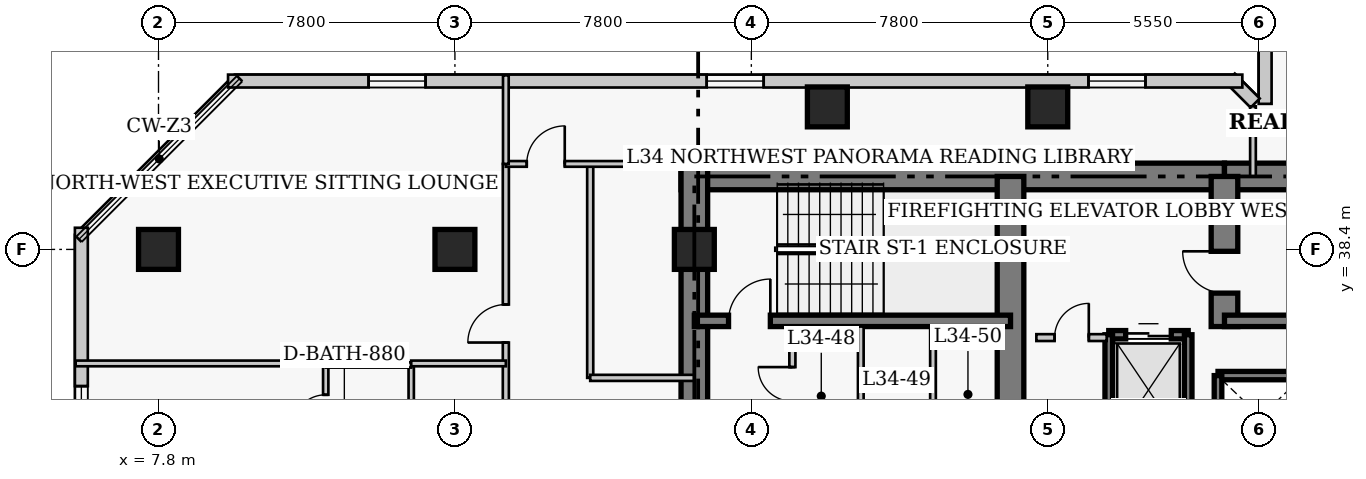
"""IFC4 building model, lengths in metres.
Left out: names, types, materials, properties, quantities, classifications, styles, units other than length and angle.
Written with IfcOpenShell. Run it as: python <this file> out.ifc"""

import sys

from ifc_helpers import new_model, si_unit, direction, frame, frame_2d, origin, origin_2d, place, context, subcontext, project, spatial, rectangle, extrude, element, fill, save


model = new_model("IFC4")
c1 = context("Model", 3, precision=1e-05, world=origin(), true_north=direction((0.0, 1.0)))
c2 = subcontext(c1, "Body", "Model", "MODEL_VIEW")
j1 = project(units=[si_unit("LENGTHUNIT", "METRE"), si_unit("PLANEANGLEUNIT", "RADIAN")], contexts=[c1])
p1 = place(None, origin())
s1 = spatial("IfcSite", under=j1, at=p1, CompositionType="ELEMENT")
p2 = place(p1, origin())
s2 = spatial("IfcBuilding", under=s1, at=p2, CompositionType="ELEMENT")
p3 = place(p2, frame((0.0, 0.0, 138.4)))
s3 = spatial("IfcBuildingStorey", under=s2, at=p3, CompositionType="ELEMENT", Elevation=138.4)
p4 = place(p3, frame((21.55, 40.32, 0.0), z_axis=(0.0, 0.0, 1.0), x_axis=(1.0, 0.0, 0.0)))
e1 = element("IfcWall", 1, at=p4, inside=s3, PredefinedType="SHEAR", context=c2, shape_type="SweptSolid", body=[
    extrude(rectangle(XDim=14.3, YDim=0.7, at=frame_2d((7.15, 0.0))), origin(), (0.0, 0.0, 1.0), 3.8),
])
p5 = place(p3, frame((35.85, 40.32, 0.0), z_axis=(0.0, 0.0, 1.0), x_axis=(1.0, 0.0, 0.0)))
e2 = element("IfcWall", 2, at=p5, inside=s3, PredefinedType="SHEAR", context=c2, shape_type="SweptSolid", body=[
    extrude(rectangle(XDim=12.6, YDim=0.7, at=frame_2d((6.3, 0.0))), origin(), (0.0, 0.0, 1.0), 3.8),
])
p6 = place(p3, frame((21.9, 27.05, 0.0), z_axis=(0.0, 0.0, 1.0), x_axis=(0.0, 1.0, 0.0)))
e3 = element("IfcWall", 3, at=p6, inside=s3, PredefinedType="SHEAR", context=c2, shape_type="SweptSolid", body=[
    extrude(rectangle(XDim=13.62, YDim=0.7, at=frame_2d((6.81, 0.0))), origin(), (0.0, 0.0, 1.0), 3.8),
])
p7 = place(p3, frame((30.22, 33.1, 0.0), z_axis=(0.0, 0.0, 1.0), x_axis=(0.0, 1.0, 0.0)))
e4 = element("IfcWall", 4, at=p7, inside=s3, PredefinedType="SHEAR", context=c2, shape_type="SweptSolid", body=[
    extrude(rectangle(XDim=7.22, YDim=0.7, at=frame_2d((3.61, 0.0))), origin(), (0.0, 0.0, 1.0), 3.8),
])
p8 = place(p3, frame((35.85, 36.37, 0.0), z_axis=(0.0, 0.0, 1.0), x_axis=(0.0, 1.0, 0.0)))
e5 = element("IfcWall", 5, at=p8, inside=s3, PredefinedType="SHEAR", context=c2, shape_type="SweptSolid", body=[
    extrude(rectangle(XDim=3.95, YDim=0.7, at=frame_2d((1.975, 0.0))), origin(), (0.0, 0.0, 1.0), 3.8),
])
p9 = place(p8, frame((0.88, 0.0, 0.0)))
e6 = element("IfcOpeningElement", 6, at=p9, cuts=e5, PredefinedType="OPENING", context=c2, shape_type="SweptSolid", body=[
    extrude(rectangle(XDim=1.1, YDim=2.15, at=frame_2d((0.55, 1.075))), frame((0.0, 0.36, 0.0), z_axis=(0.0, -1.0, 0.0), x_axis=(1.0, 0.0, 0.0)), (0.0, 0.0, 1.0), 0.72),
])
p10 = place(p3, frame((21.9, 36.52, 0.0), z_axis=(0.0, 0.0, 1.0), x_axis=(1.0, 0.0, 0.0)))
e7 = element("IfcWall", 7, at=p10, inside=s3, PredefinedType="SHEAR", context=c2, shape_type="SweptSolid", body=[
    extrude(rectangle(XDim=8.32, YDim=0.3, at=frame_2d((4.16, 0.0))), origin(), (0.0, 0.0, 1.0), 3.8),
])
p11 = place(p10, frame((0.9, 0.0, 0.0)))
e8 = element("IfcOpeningElement", 8, at=p11, cuts=e7, PredefinedType="OPENING", context=c2, shape_type="SweptSolid", body=[
    extrude(rectangle(XDim=1.1, YDim=2.15, at=frame_2d((0.55, 1.075))), frame((0.0, 0.16, 0.0), z_axis=(0.0, -1.0, 0.0), x_axis=(1.0, 0.0, 0.0)), (0.0, 0.0, 1.0), 0.32),
])
p12 = place(p3, frame((35.85, 36.52, 0.0), z_axis=(0.0, 0.0, 1.0), x_axis=(1.0, 0.0, 0.0)))
e9 = element("IfcWall", 9, at=p12, inside=s3, PredefinedType="SHEAR", context=c2, shape_type="SweptSolid", body=[
    extrude(rectangle(XDim=8.33, YDim=0.3, at=frame_2d((4.165, 0.0))), origin(), (0.0, 0.0, 1.0), 3.8),
])
for number, where, z_axis, x_axis in (
    (10, (7.8, 38.4, 0.0), (0.0, 0.0, 1.0), (1.0, 0.0, 0.0)),
    (11, (15.6, 38.4, 0.0), (0.0, 0.0, 1.0), (1.0, 0.0, 0.0)),
    (12, (21.9, 38.4, 0.0), (0.0, 0.0, 1.0), (1.0, 0.0, 0.0)),
    (13, (25.4, 42.15, 0.0), (0.0, 0.0, 1.0), (1.0, 0.0, 0.0)),
    (14, (31.2, 42.15, 0.0), (0.0, 0.0, 1.0), (1.0, 0.0, 0.0)),
):
    element("IfcColumn", number, at=place(p3, frame(where, z_axis=z_axis, x_axis=x_axis)), inside=s3, PredefinedType="COLUMN", context=c2, shape_type="SweptSolid", body=[
        extrude(rectangle(XDim=1.05, YDim=1.05, at=origin_2d()), origin(), (0.0, 0.0, 1.0), 3.8),
    ])
p13 = place(p3, frame((36.92, 44.37, 0.0), z_axis=(0.0, 0.0, 1.0), x_axis=(0.0, -1.0, 0.0)))
e15 = element("IfcWall", 15, at=p13, inside=s3, PredefinedType="SOLIDWALL", context=c2, shape_type="SweptSolid", body=[
    extrude(rectangle(XDim=2.14, YDim=0.34, at=frame_2d((1.07, 0.0))), origin(), (0.0, 0.0, 1.0), 3.55),
])
p14 = place(p3, frame((36.658, 42.251, 0.0), z_axis=(0.0, 0.0, 1.0), x_axis=(-0.707106781187, 0.707106781187, 0.0)))
e16 = element("IfcWall", 16, at=p14, inside=s3, PredefinedType="SOLIDWALL", context=c2, shape_type="SweptSolid", body=[
    extrude(rectangle(XDim=0.929, YDim=0.34, at=frame_2d((0.464, 0.0))), origin(), (0.0, 0.0, 1.0), 3.55),
])
p15 = place(p3, frame((36.32, 42.83, 0.0), z_axis=(0.0, 0.0, 1.0), x_axis=(-1.0, 0.0, 0.0)))
e17 = element("IfcWall", 17, at=p15, inside=s3, PredefinedType="SOLIDWALL", context=c2, shape_type="SweptSolid", body=[
    extrude(rectangle(XDim=26.69, YDim=0.34, at=frame_2d((13.345, 0.0))), origin(), (0.0, 0.0, 1.0), 3.55),
])
p16 = place(p15, frame((2.548, 0.0, 0.85)))
e18 = element("IfcOpeningElement", 18, at=p16, cuts=e17, PredefinedType="OPENING", context=c2, shape_type="SweptSolid", body=[
    extrude(rectangle(XDim=1.5, YDim=1.75, at=frame_2d((0.75, 0.875))), frame((0.0, 0.18, 0.0), z_axis=(0.0, -1.0, 0.0), x_axis=(1.0, 0.0, 0.0)), (0.0, 0.0, 1.0), 0.36),
])
p17 = place(p15, frame((12.595, 0.0, 0.85)))
e19 = element("IfcOpeningElement", 19, at=p17, cuts=e17, PredefinedType="OPENING", context=c2, shape_type="SweptSolid", body=[
    extrude(rectangle(XDim=1.5, YDim=1.75, at=frame_2d((0.75, 0.875))), frame((0.0, 0.18, 0.0), z_axis=(0.0, -1.0, 0.0), x_axis=(1.0, 0.0, 0.0)), (0.0, 0.0, 1.0), 0.36),
])
p18 = place(p15, frame((21.492, 0.0, 0.85)))
e20 = element("IfcOpeningElement", 20, at=p18, cuts=e17, PredefinedType="OPENING", context=c2, shape_type="SweptSolid", body=[
    extrude(rectangle(XDim=1.5, YDim=1.75, at=frame_2d((0.75, 0.875))), frame((0.0, 0.18, 0.0), z_axis=(0.0, -1.0, 0.0), x_axis=(1.0, 0.0, 0.0)), (0.0, 0.0, 1.0), 0.36),
])
p19 = place(p3, frame((5.77, 38.97, 0.0), z_axis=(0.0, 0.0, 1.0), x_axis=(0.0, -1.0, 0.0)))
e21 = element("IfcWall", 21, at=p19, inside=s3, PredefinedType="SOLIDWALL", context=c2, shape_type="SweptSolid", body=[
    extrude(rectangle(XDim=30.14, YDim=0.34, at=frame_2d((15.07, 0.0))), origin(), (0.0, 0.0, 1.0), 3.55),
])
p20 = place(p19, frame((4.167, 0.0, 0.85)))
e22 = element("IfcOpeningElement", 22, at=p20, cuts=e21, PredefinedType="OPENING", context=c2, shape_type="SweptSolid", body=[
    extrude(rectangle(XDim=1.5, YDim=1.75, at=frame_2d((0.75, 0.875))), frame((0.0, 0.18, 0.0), z_axis=(0.0, -1.0, 0.0), x_axis=(1.0, 0.0, 0.0)), (0.0, 0.0, 1.0), 0.36),
])
p21 = place(p19, frame((10.552, 0.0, 0.85)))
e23 = element("IfcOpeningElement", 23, at=p21, cuts=e21, PredefinedType="OPENING", context=c2, shape_type="SweptSolid", body=[
    extrude(rectangle(XDim=1.5, YDim=1.75, at=frame_2d((0.75, 0.875))), frame((0.0, 0.18, 0.0), z_axis=(0.0, -1.0, 0.0), x_axis=(1.0, 0.0, 0.0)), (0.0, 0.0, 1.0), 0.36),
])
p22 = place(p19, frame((16.938, 0.0, 0.85)))
e24 = element("IfcOpeningElement", 24, at=p22, cuts=e21, PredefinedType="OPENING", context=c2, shape_type="SweptSolid", body=[
    extrude(rectangle(XDim=1.5, YDim=1.75, at=frame_2d((0.75, 0.875))), frame((0.0, 0.18, 0.0), z_axis=(0.0, -1.0, 0.0), x_axis=(1.0, 0.0, 0.0)), (0.0, 0.0, 1.0), 0.36),
])
p23 = place(p19, frame((25.623, 0.0, 0.85)))
e25 = element("IfcOpeningElement", 25, at=p23, cuts=e21, PredefinedType="OPENING", context=c2, shape_type="SweptSolid", body=[
    extrude(rectangle(XDim=1.5, YDim=1.75, at=frame_2d((0.75, 0.875))), frame((0.0, 0.18, 0.0), z_axis=(0.0, -1.0, 0.0), x_axis=(1.0, 0.0, 0.0)), (0.0, 0.0, 1.0), 0.36),
])
p24 = place(p3, frame((35.68, 35.08, 0.0), z_axis=(0.0, 0.0, 1.0), x_axis=(1.0, 0.0, 0.0)))
e26 = element("IfcWall", 26, at=p24, inside=s3, PredefinedType="SHEAR", context=c2, shape_type="SweptSolid", body=[
    extrude(rectangle(XDim=2.32, YDim=0.22, at=frame_2d((1.16, 0.0))), origin(), (0.0, 0.0, 1.0), 3.8),
])
p25 = place(p3, frame((35.68, 32.92, 0.0), z_axis=(0.0, 0.0, 1.0), x_axis=(0.0, 1.0, 0.0)))
e27 = element("IfcWall", 27, at=p25, inside=s3, PredefinedType="SHEAR", context=c2, shape_type="SweptSolid", body=[
    extrude(rectangle(XDim=2.16, YDim=0.2, at=frame_2d((1.08, 0.0))), origin(), (0.0, 0.0, 1.0), 3.8),
])
p26 = place(p3, frame((32.805, 36.155, 0.0), z_axis=(0.0, 0.0, 1.0), x_axis=(1.0, 0.0, 0.0)))
e28 = element("IfcWall", 28, at=p26, inside=s3, PredefinedType="SHEAR", context=c2, shape_type="SweptSolid", body=[
    extrude(rectangle(XDim=2.09, YDim=0.22, at=frame_2d((1.045, 0.0))), origin(), (0.0, 0.0, 1.0), 3.8),
])
p27 = place(p26, frame((0.445, 0.0, 0.0)))
e29 = element("IfcOpeningElement", 29, at=p27, cuts=e28, PredefinedType="OPENING", context=c2, shape_type="SweptSolid", body=[
    extrude(rectangle(XDim=1.2, YDim=2.15, at=frame_2d((0.6, 1.075))), frame((0.0, 0.12, 0.0), z_axis=(0.0, -1.0, 0.0), x_axis=(1.0, 0.0, 0.0)), (0.0, 0.0, 1.0), 0.24),
])
for number, where, z_axis, x_axis in (
    (30, (32.805, 33.245, 0.0), (0.0, 0.0, 1.0), (0.0, 1.0, 0.0)),
    (31, (34.895, 33.245, 0.0), (0.0, 0.0, 1.0), (0.0, 1.0, 0.0)),
):
    element("IfcWall", number, at=place(p3, frame(where, z_axis=z_axis, x_axis=x_axis)), inside=s3, PredefinedType="SHEAR", context=c2, shape_type="SweptSolid", body=[
        extrude(rectangle(XDim=2.91, YDim=0.2, at=frame_2d((1.455, 0.0))), origin(), (0.0, 0.0, 1.0), 3.8),
    ])
p28 = place(p3, frame((30.9, 36.08, 0.0), z_axis=(0.0, 0.0, 1.0), x_axis=(1.0, 0.0, 0.0)))
e32 = element("IfcWall", 32, at=p28, inside=s3, PredefinedType="PARTITIONING", context=c2, shape_type="SweptSolid", body=[
    extrude(rectangle(XDim=1.85, YDim=0.18, at=frame_2d((0.925, 0.0))), origin(), (0.0, 0.0, 1.0), 3.55),
])
p29 = place(p28, frame((0.48, 0.0, 0.0)))
e33 = element("IfcOpeningElement", 33, at=p29, cuts=e32, PredefinedType="OPENING", context=c2, shape_type="SweptSolid", body=[
    extrude(rectangle(XDim=0.9, YDim=2.15, at=frame_2d((0.45, 1.075))), frame((0.0, 0.1, 0.0), z_axis=(0.0, -1.0, 0.0), x_axis=(1.0, 0.0, 0.0)), (0.0, 0.0, 1.0), 0.2),
])
p30 = place(p3, frame((24.48, 32.8, 0.0), z_axis=(0.0, 0.0, 1.0), x_axis=(0.0, 1.0, 0.0)))
e34 = element("IfcWall", 34, at=p30, inside=s3, PredefinedType="PARTITIONING", context=c2, shape_type="SweptSolid", body=[
    extrude(rectangle(XDim=3.57, YDim=0.16, at=frame_2d((1.785, 0.0))), origin(), (0.0, 0.0, 1.0), 3.55),
])
p31 = place(p30, frame((1.604, 0.0, 0.0)))
e35 = element("IfcOpeningElement", 35, at=p31, cuts=e34, PredefinedType="OPENING", context=c2, shape_type="SweptSolid", body=[
    extrude(rectangle(XDim=0.9, YDim=2.1, at=frame_2d((0.45, 1.05))), frame((0.0, 0.09, 0.0), z_axis=(0.0, -1.0, 0.0), x_axis=(1.0, 0.0, 0.0)), (0.0, 0.0, 1.0), 0.18),
])
for number, where, z_axis, x_axis in (
    (36, (26.28, 32.75, 0.0), (0.0, 0.0, 1.0), (0.0, 1.0, 0.0)),
    (37, (28.18, 32.75, 0.0), (0.0, 0.0, 1.0), (0.0, 1.0, 0.0)),
):
    element("IfcWall", number, at=place(p3, frame(where, z_axis=z_axis, x_axis=x_axis)), inside=s3, PredefinedType="PARTITIONING", context=c2, shape_type="SweptSolid", body=[
        extrude(rectangle(XDim=3.62, YDim=0.15, at=frame_2d((1.81, 0.0))), origin(), (0.0, 0.0, 1.0), 3.55),
    ])
p32 = place(p3, frame((16.94, 6.85, 0.0), z_axis=(0.0, 0.0, 1.0), x_axis=(0.0, 1.0, 0.0)))
e38 = element("IfcWall", 38, at=p32, inside=s3, PredefinedType="PARTITIONING", context=c2, shape_type="SweptSolid", body=[
    extrude(rectangle(XDim=33.8, YDim=0.16, at=frame_2d((16.9, 0.0))), origin(), (0.0, 0.0, 1.0), 3.55),
])
p33 = place(p32, frame((1.7, 0.0, 0.0)))
e39 = element("IfcOpeningElement", 39, at=p33, cuts=e38, PredefinedType="OPENING", context=c2, shape_type="SweptSolid", body=[
    extrude(rectangle(XDim=0.95, YDim=2.1, at=frame_2d((0.475, 1.05))), frame((0.0, 0.09, 0.0), z_axis=(0.0, -1.0, 0.0), x_axis=(1.0, 0.0, 0.0)), (0.0, 0.0, 1.0), 0.18),
])
p34 = place(p32, frame((8.275, 0.0, 0.0)))
e40 = element("IfcOpeningElement", 40, at=p34, cuts=e38, PredefinedType="OPENING", context=c2, shape_type="SweptSolid", body=[
    extrude(rectangle(XDim=0.95, YDim=2.1, at=frame_2d((0.475, 1.05))), frame((0.0, 0.09, 0.0), z_axis=(0.0, -1.0, 0.0), x_axis=(1.0, 0.0, 0.0)), (0.0, 0.0, 1.0), 0.18),
])
p35 = place(p32, frame((17.075, 0.0, 0.0)))
e41 = element("IfcOpeningElement", 41, at=p35, cuts=e38, PredefinedType="OPENING", context=c2, shape_type="SweptSolid", body=[
    extrude(rectangle(XDim=0.95, YDim=2.1, at=frame_2d((0.475, 1.05))), frame((0.0, 0.09, 0.0), z_axis=(0.0, -1.0, 0.0), x_axis=(1.0, 0.0, 0.0)), (0.0, 0.0, 1.0), 0.18),
])
p36 = place(p32, frame((24.775, 0.0, 0.0)))
e42 = element("IfcOpeningElement", 42, at=p36, cuts=e38, PredefinedType="OPENING", context=c2, shape_type="SweptSolid", body=[
    extrude(rectangle(XDim=0.95, YDim=2.1, at=frame_2d((0.475, 1.05))), frame((0.0, 0.09, 0.0), z_axis=(0.0, -1.0, 0.0), x_axis=(1.0, 0.0, 0.0)), (0.0, 0.0, 1.0), 0.18),
])
p37 = place(p32, frame((29.1, 0.0, 0.0)))
e43 = element("IfcOpeningElement", 43, at=p37, cuts=e38, PredefinedType="OPENING", context=c2, shape_type="SweptSolid", body=[
    extrude(rectangle(XDim=1.0, YDim=2.15, at=frame_2d((0.5, 1.075))), frame((0.0, 0.09, 0.0), z_axis=(0.0, -1.0, 0.0), x_axis=(1.0, 0.0, 0.0)), (0.0, 0.0, 1.0), 0.18),
])
p38 = place(p3, frame((19.16, 35.02, 0.0), z_axis=(0.0, 0.0, 1.0), x_axis=(0.0, 1.0, 0.0)))
e44 = element("IfcWall", 44, at=p38, inside=s3, PredefinedType="PARTITIONING", context=c2, shape_type="SweptSolid", body=[
    extrude(rectangle(XDim=5.63, YDim=0.16, at=frame_2d((2.815, 0.0))), origin(), (0.0, 0.0, 1.0), 3.55),
])
p39 = place(p3, frame((19.16, 35.02, 0.0), z_axis=(0.0, 0.0, 1.0), x_axis=(1.0, 0.0, 0.0)))
e45 = element("IfcWall", 45, at=p39, inside=s3, PredefinedType="PARTITIONING", context=c2, shape_type="SweptSolid", body=[
    extrude(rectangle(XDim=2.74, YDim=0.16, at=frame_2d((1.37, 0.0))), origin(), (0.0, 0.0, 1.0), 3.55),
])
p40 = place(p3, frame((16.94, 40.65, 0.0), z_axis=(0.0, 0.0, 1.0), x_axis=(1.0, 0.0, 0.0)))
e46 = element("IfcWall", 46, at=p40, inside=s3, PredefinedType="PARTITIONING", context=c2, shape_type="SweptSolid", body=[
    extrude(rectangle(XDim=5.16, YDim=0.15, at=frame_2d((2.58, 0.0))), origin(), (0.0, 0.0, 1.0), 3.55),
])
p41 = place(p40, frame((0.55, 0.0, 0.0)))
e47 = element("IfcOpeningElement", 47, at=p41, cuts=e46, PredefinedType="OPENING", context=c2, shape_type="SweptSolid", body=[
    extrude(rectangle(XDim=1.0, YDim=2.15, at=frame_2d((0.5, 1.075))), frame((0.0, 0.085, 0.0), z_axis=(0.0, -1.0, 0.0), x_axis=(1.0, 0.0, 0.0)), (0.0, 0.0, 1.0), 0.17),
])
p42 = place(p3, frame((16.94, 40.65, 0.0), z_axis=(0.0, 0.0, 1.0), x_axis=(0.0, 1.0, 0.0)))
e48 = element("IfcWall", 48, at=p42, inside=s3, PredefinedType="PARTITIONING", context=c2, shape_type="SweptSolid", body=[
    extrude(rectangle(XDim=2.33, YDim=0.15, at=frame_2d((1.165, 0.0))), origin(), (0.0, 0.0, 1.0), 3.55),
])
p43 = place(p3, frame((36.6, 40.32, 0.0), z_axis=(0.0, 0.0, 1.0), x_axis=(0.0, 1.0, 0.0)))
e49 = element("IfcWall", 49, at=p43, inside=s3, PredefinedType="PARTITIONING", context=c2, shape_type="SweptSolid", body=[
    extrude(rectangle(XDim=1.845, YDim=0.15, at=frame_2d((0.922, 0.0))), origin(), (0.0, 0.0, 1.0), 3.55),
])
p44 = place(p3, frame((12.2, 32.91, 0.0), z_axis=(0.0, 0.0, 1.0), x_axis=(0.0, 1.0, 0.0)))
e50 = element("IfcWall", 50, at=p44, inside=s3, PredefinedType="PLUMBINGWALL", context=c2, shape_type="SweptSolid", body=[
    extrude(rectangle(XDim=2.45, YDim=0.14, at=frame_2d((1.225, 0.0))), origin(), (0.0, 0.0, 1.0), 3.55),
])
p45 = place(p44, frame((0.785, 0.0, 0.0)))
e51 = element("IfcOpeningElement", 51, at=p45, cuts=e50, PredefinedType="OPENING", context=c2, shape_type="SweptSolid", body=[
    extrude(rectangle(XDim=0.88, YDim=2.05, at=frame_2d((0.44, 1.025))), frame((0.0, 0.08, 0.0), z_axis=(0.0, -1.0, 0.0), x_axis=(1.0, 0.0, 0.0)), (0.0, 0.0, 1.0), 0.16),
])
p46 = place(p3, frame((14.45, 32.91, 0.0), z_axis=(0.0, 0.0, 1.0), x_axis=(0.0, 1.0, 0.0)))
e52 = element("IfcWall", 52, at=p46, inside=s3, PredefinedType="PLUMBINGWALL", context=c2, shape_type="SweptSolid", body=[
    extrude(rectangle(XDim=2.45, YDim=0.14, at=frame_2d((1.225, 0.0))), origin(), (0.0, 0.0, 1.0), 3.55),
])
p47 = place(p3, frame((12.2, 35.36, 0.0), z_axis=(0.0, 0.0, 1.0), x_axis=(1.0, 0.0, 0.0)))
e53 = element("IfcWall", 53, at=p47, inside=s3, PredefinedType="PLUMBINGWALL", context=c2, shape_type="SweptSolid", body=[
    extrude(rectangle(XDim=2.25, YDim=0.14, at=frame_2d((1.125, 0.0))), origin(), (0.0, 0.0, 1.0), 3.55),
])
p48 = place(p3, frame((5.62, 35.4, 0.0), z_axis=(0.0, 0.0, 1.0), x_axis=(1.0, 0.0, 0.0)))
e54 = element("IfcWall", 54, at=p48, inside=s3, PredefinedType="PARTITIONING", context=c2, shape_type="SweptSolid", body=[
    extrude(rectangle(XDim=6.58, YDim=0.15, at=frame_2d((3.29, 0.0))), origin(), (0.0, 0.0, 1.0), 3.55),
])
p49 = place(p3, frame((14.45, 35.4, 0.0), z_axis=(0.0, 0.0, 1.0), x_axis=(1.0, 0.0, 0.0)))
e55 = element("IfcWall", 55, at=p49, inside=s3, PredefinedType="PARTITIONING", context=c2, shape_type="SweptSolid", body=[
    extrude(rectangle(XDim=2.49, YDim=0.15, at=frame_2d((1.245, 0.0))), origin(), (0.0, 0.0, 1.0), 3.55),
])
p50 = place(p16, origin())
e56 = element("IfcWindow", 56, at=p50, inside=s3, PartitioningType="SINGLE_PANEL", PredefinedType="WINDOW", context=c2, shape_type="SweptSolid", body=[
    extrude(rectangle(XDim=1.5, YDim=1.75, at=frame_2d((0.75, 0.875))), frame((0.0, 0.03, 0.0), z_axis=(0.0, -1.0, 0.0), x_axis=(1.0, 0.0, 0.0)), (0.0, 0.0, 1.0), 0.06),
])
fill(e18, e56)
p51 = place(p17, origin())
e57 = element("IfcWindow", 57, at=p51, inside=s3, PartitioningType="SINGLE_PANEL", PredefinedType="WINDOW", context=c2, shape_type="SweptSolid", body=[
    extrude(rectangle(XDim=1.5, YDim=1.75, at=frame_2d((0.75, 0.875))), frame((0.0, 0.03, 0.0), z_axis=(0.0, -1.0, 0.0), x_axis=(1.0, 0.0, 0.0)), (0.0, 0.0, 1.0), 0.06),
])
fill(e19, e57)
p52 = place(p18, origin())
e58 = element("IfcWindow", 58, at=p52, inside=s3, PartitioningType="SINGLE_PANEL", PredefinedType="WINDOW", context=c2, shape_type="SweptSolid", body=[
    extrude(rectangle(XDim=1.5, YDim=1.75, at=frame_2d((0.75, 0.875))), frame((0.0, 0.03, 0.0), z_axis=(0.0, -1.0, 0.0), x_axis=(1.0, 0.0, 0.0)), (0.0, 0.0, 1.0), 0.06),
])
fill(e20, e58)
p53 = place(p20, origin())
e59 = element("IfcWindow", 59, at=p53, inside=s3, PartitioningType="SINGLE_PANEL", PredefinedType="WINDOW", context=c2, shape_type="SweptSolid", body=[
    extrude(rectangle(XDim=1.5, YDim=1.75, at=frame_2d((0.75, 0.875))), frame((0.0, 0.03, 0.0), z_axis=(0.0, -1.0, 0.0), x_axis=(1.0, 0.0, 0.0)), (0.0, 0.0, 1.0), 0.06),
])
fill(e22, e59)
p54 = place(p27, origin())
e60 = element("IfcDoor", 60, at=p54, inside=s3, OperationType="DOUBLE_DOOR_SLIDING", PredefinedType="DOOR", context=c2, shape_type="SweptSolid", body=[
    extrude(rectangle(XDim=1.2, YDim=2.15, at=frame_2d((0.6, 1.075))), frame((0.0, 0.025, 0.0), z_axis=(0.0, -1.0, 0.0), x_axis=(1.0, 0.0, 0.0)), (0.0, 0.0, 1.0), 0.05),
])
fill(e29, e60)
p55 = place(p29, origin())
e61 = element("IfcDoor", 61, at=p55, inside=s3, OperationType="SINGLE_SWING_RIGHT", PredefinedType="DOOR", context=c2, shape_type="SweptSolid", body=[
    extrude(rectangle(XDim=0.9, YDim=2.15, at=frame_2d((0.45, 1.075))), frame((0.0, 0.025, 0.0), z_axis=(0.0, -1.0, 0.0), x_axis=(1.0, 0.0, 0.0)), (0.0, 0.0, 1.0), 0.05),
])
fill(e33, e61)
p56 = place(p31, origin())
e62 = element("IfcDoor", 62, at=p56, inside=s3, OperationType="SINGLE_SWING_RIGHT", PredefinedType="DOOR", context=c2, shape_type="SweptSolid", body=[
    extrude(rectangle(XDim=0.9, YDim=2.1, at=frame_2d((0.45, 1.05))), frame((0.0, 0.025, 0.0), z_axis=(0.0, -1.0, 0.0), x_axis=(1.0, 0.0, 0.0)), (0.0, 0.0, 1.0), 0.05),
])
fill(e35, e62)
p57 = place(p41, origin())
e63 = element("IfcDoor", 63, at=p57, inside=s3, OperationType="SINGLE_SWING_RIGHT", PredefinedType="DOOR", context=c2, shape_type="SweptSolid", body=[
    extrude(rectangle(XDim=1.0, YDim=2.15, at=frame_2d((0.5, 1.075))), frame((0.0, 0.025, 0.0), z_axis=(0.0, -1.0, 0.0), x_axis=(1.0, 0.0, 0.0)), (0.0, 0.0, 1.0), 0.05),
])
fill(e47, e63)
p58 = place(p45, origin())
e64 = element("IfcDoor", 64, at=p58, inside=s3, OperationType="SINGLE_SWING_LEFT", PredefinedType="DOOR", context=c2, shape_type="SweptSolid", body=[
    extrude(rectangle(XDim=0.88, YDim=2.05, at=frame_2d((0.44, 1.025))), frame((0.0, 0.025, 0.0), z_axis=(0.0, -1.0, 0.0), x_axis=(1.0, 0.0, 0.0)), (0.0, 0.0, 1.0), 0.05),
])
fill(e51, e64)
p59 = place(p37, origin())
e65 = element("IfcDoor", 65, at=p59, inside=s3, OperationType="SINGLE_SWING_LEFT", PredefinedType="DOOR", context=c2, shape_type="SweptSolid", body=[
    extrude(rectangle(XDim=1.0, YDim=2.15, at=frame_2d((0.5, 1.075))), frame((0.0, 0.025, 0.0), z_axis=(0.0, -1.0, 0.0), x_axis=(1.0, 0.0, 0.0)), (0.0, 0.0, 1.0), 0.05),
])
fill(e43, e65)
p60 = place(p11, origin())
e66 = element("IfcDoor", 66, at=p60, inside=s3, OperationType="SINGLE_SWING_RIGHT", PredefinedType="DOOR", context=c2, shape_type="SweptSolid", body=[
    extrude(rectangle(XDim=1.1, YDim=2.15, at=frame_2d((0.55, 1.075))), frame((0.0, 0.025, 0.0), z_axis=(0.0, -1.0, 0.0), x_axis=(1.0, 0.0, 0.0)), (0.0, 0.0, 1.0), 0.05),
])
fill(e8, e66)
p61 = place(p9, origin())
e67 = element("IfcDoor", 67, at=p61, inside=s3, OperationType="SINGLE_SWING_RIGHT", PredefinedType="DOOR", context=c2, shape_type="SweptSolid", body=[
    extrude(rectangle(XDim=1.1, YDim=2.15, at=frame_2d((0.55, 1.075))), frame((0.0, 0.025, 0.0), z_axis=(0.0, -1.0, 0.0), x_axis=(1.0, 0.0, 0.0)), (0.0, 0.0, 1.0), 0.05),
])
fill(e6, e67)
save(model, sys.argv[1])
